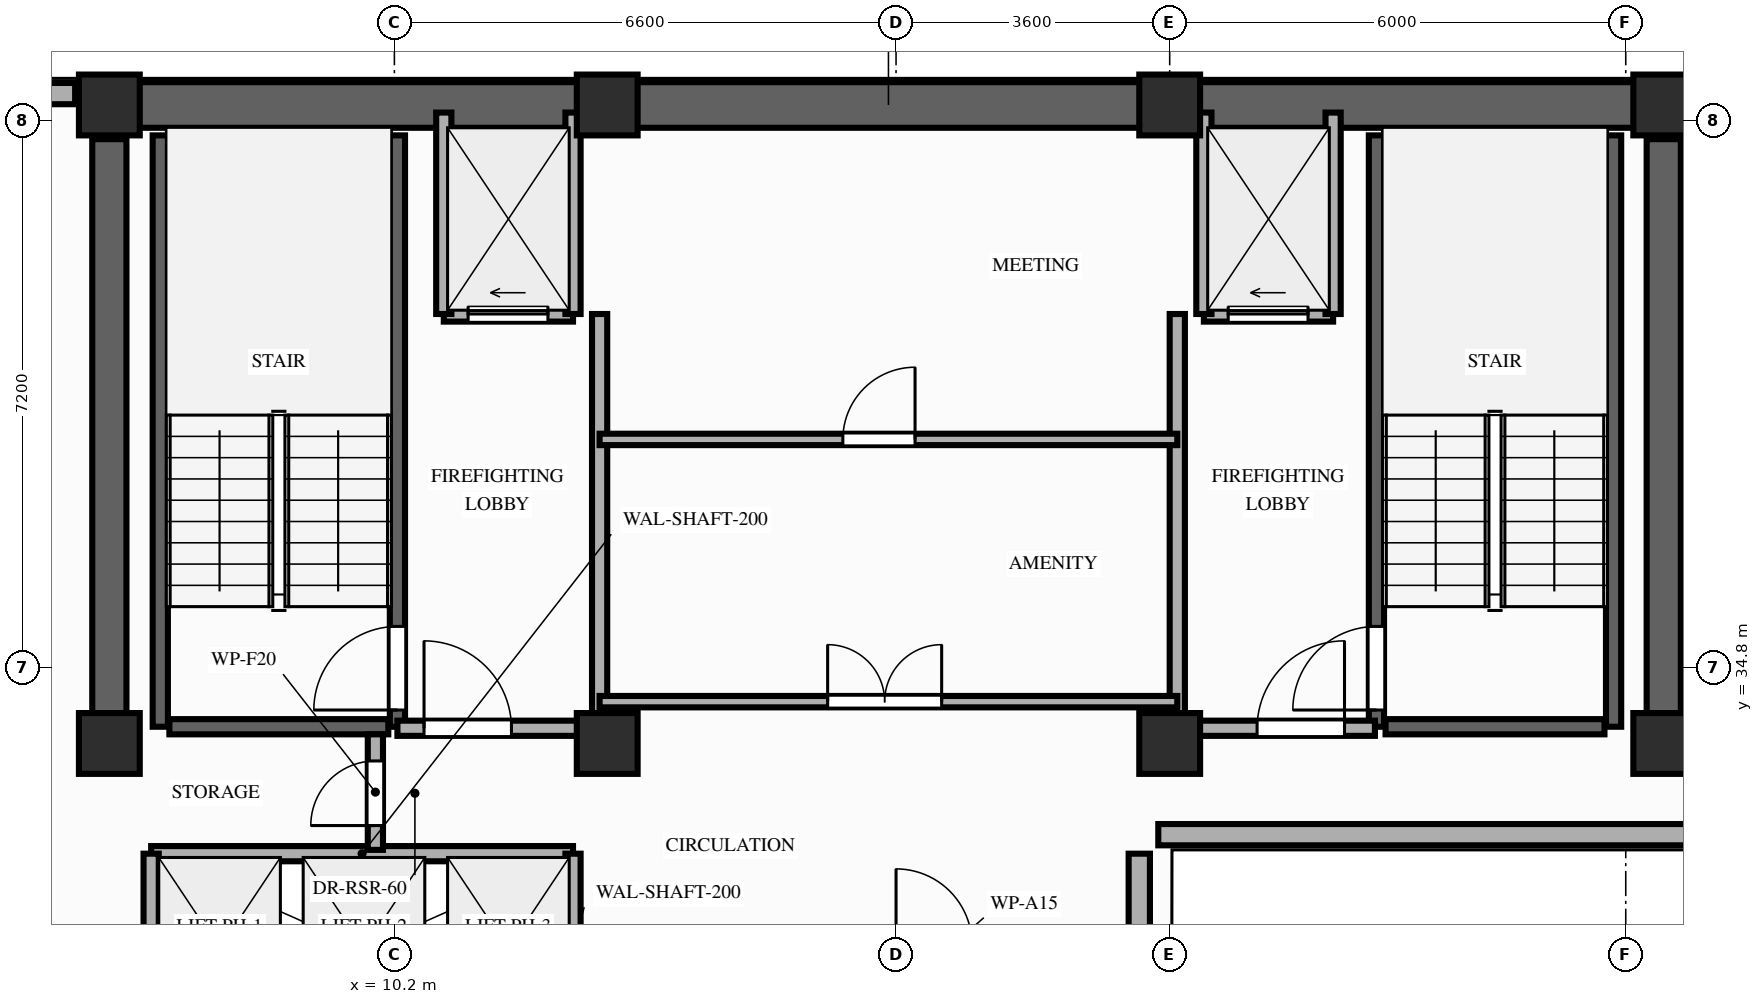
"""IFC4 building model, lengths in metres.
Left out: names, types, materials, properties, quantities, classifications, styles, units other than length and angle.
Written with IfcOpenShell. Run it as: python <this file> out.ifc"""

import sys

from ifc_helpers import new_model, si_unit, direction, frame, frame_2d, origin, origin_2d, place, context, subcontext, project, spatial, rectangle, extrude, element, fill, save


model = new_model("IFC4")
c1 = context("Model", 3, precision=1e-05, world=origin(), true_north=direction((0.0, 1.0)))
c2 = subcontext(c1, "Body", "Model", "MODEL_VIEW")
j1 = project(units=[si_unit("LENGTHUNIT", "METRE"), si_unit("PLANEANGLEUNIT", "RADIAN")], contexts=[c1])
p1 = place(None, origin())
s1 = spatial("IfcSite", under=j1, at=p1, CompositionType="ELEMENT")
p2 = place(p1, origin())
s2 = spatial("IfcBuilding", under=s1, at=p2, CompositionType="ELEMENT")
p3 = place(p2, frame((0.0, 0.0, 234.4)))
s3 = spatial("IfcBuildingStorey", under=s2, at=p3, CompositionType="ELEMENT", Elevation=234.4)
for number, where, z_axis, x_axis in (
    (1, (6.45, 33.8, 0.0), (0.0, 0.0, 1.0), (1.0, 0.0, 0.0)),
    (2, (13.0, 33.8, 0.0), (0.0, 0.0, 1.0), (1.0, 0.0, 0.0)),
    (3, (20.4, 33.8, 0.0), (0.0, 0.0, 1.0), (1.0, 0.0, 0.0)),
    (4, (26.9, 33.8, 0.0), (0.0, 0.0, 1.0), (1.0, 0.0, 0.0)),
    (5, (6.45, 42.2, 0.0), (0.0, 0.0, 1.0), (1.0, 0.0, 0.0)),
    (6, (13.0, 42.2, 0.0), (0.0, 0.0, 1.0), (1.0, 0.0, 0.0)),
    (7, (20.4, 42.2, 0.0), (0.0, 0.0, 1.0), (1.0, 0.0, 0.0)),
    (8, (26.9, 42.2, 0.0), (0.0, 0.0, 1.0), (1.0, 0.0, 0.0)),
):
    element("IfcColumn", number, at=place(p3, frame(where, z_axis=z_axis, x_axis=x_axis)), inside=s3, PredefinedType="COLUMN", context=c2, shape_type="SweptSolid", body=[
        extrude(rectangle(XDim=0.8, YDim=0.8, at=origin_2d()), origin(), (0.0, 0.0, 1.0), 3.2),
    ])
p4 = place(p3, frame((20.0, 10.8, 0.0), z_axis=(0.0, 0.0, 1.0), x_axis=(0.0, 1.0, 0.0)))
e9 = element("IfcWall", 9, at=p4, inside=s3, PredefinedType="STANDARD", context=c2, shape_type="SweptSolid", body=[
    extrude(rectangle(XDim=21.55, YDim=0.28, at=frame_2d((10.775, 0.0))), origin(), (0.0, 0.0, 1.0), 2.55),
])
p5 = place(p4, frame((3.08, 0.0, 0.85)))
e10 = element("IfcOpeningElement", 10, at=p5, cuts=e9, PredefinedType="OPENING", context=c2, shape_type="SweptSolid", body=[
    extrude(rectangle(XDim=2.6, YDim=1.45, at=frame_2d((1.3, 0.725))), frame((0.0, 0.15, 0.0), z_axis=(0.0, -1.0, 0.0), x_axis=(1.0, 0.0, 0.0)), (0.0, 0.0, 1.0), 0.3),
])
p6 = place(p4, frame((8.6, 0.0, 0.85)))
e11 = element("IfcOpeningElement", 11, at=p6, cuts=e9, PredefinedType="OPENING", context=c2, shape_type="SweptSolid", body=[
    extrude(rectangle(XDim=2.6, YDim=1.45, at=frame_2d((1.3, 0.725))), frame((0.0, 0.15, 0.0), z_axis=(0.0, -1.0, 0.0), x_axis=(1.0, 0.0, 0.0)), (0.0, 0.0, 1.0), 0.3),
])
p7 = place(p3, frame((6.0, 42.35, 0.0), z_axis=(0.0, 0.0, 1.0), x_axis=(-1.0, 0.0, 0.0)))
e12 = element("IfcWall", 12, at=p7, inside=s3, PredefinedType="STANDARD", context=c2, shape_type="SweptSolid", body=[
    extrude(rectangle(XDim=1.0, YDim=0.28, at=frame_2d((0.5, 0.0))), origin(), (0.0, 0.0, 1.0), 3.02),
])
p8 = place(p3, frame((20.25, 32.6, 0.0), z_axis=(0.0, 0.0, 1.0), x_axis=(1.0, 0.0, 0.0)))
e13 = element("IfcWall", 13, at=p8, inside=s3, PredefinedType="STANDARD", context=c2, shape_type="SweptSolid", body=[
    extrude(rectangle(XDim=7.35, YDim=0.28, at=frame_2d((3.675, 0.0))), origin(), (0.0, 0.0, 1.0), 2.55),
])
p9 = place(p3, frame((6.45, 42.2, 0.0), z_axis=(0.0, 0.0, 1.0), x_axis=(1.0, 0.0, 0.0)))
e14 = element("IfcWall", 14, at=p9, inside=s3, PredefinedType="SHEAR", context=c2, shape_type="SweptSolid", body=[
    extrude(rectangle(XDim=20.45, YDim=0.6, at=frame_2d((10.225, 0.0))), origin(), (0.0, 0.0, 1.0), 3.02),
])
for number, where, z_axis, x_axis in (
    (15, (6.45, 33.8, 0.0), (0.0, 0.0, 1.0), (0.0, 1.0, 0.0)),
    (16, (26.9, 33.8, 0.0), (0.0, 0.0, 1.0), (0.0, 1.0, 0.0)),
):
    element("IfcWall", number, at=place(p3, frame(where, z_axis=z_axis, x_axis=x_axis)), inside=s3, PredefinedType="SHEAR", context=c2, shape_type="SweptSolid", body=[
        extrude(rectangle(XDim=7.95, YDim=0.45, at=frame_2d((3.975, 0.0))), origin(), (0.0, 0.0, 1.0), 3.02),
    ])
p10 = place(p3, frame((7.12, 34.02, 0.0), z_axis=(0.0, 0.0, 1.0), x_axis=(0.0, 1.0, 0.0)))
e17 = element("IfcWall", 17, at=p10, inside=s3, PredefinedType="SHEAR", context=c2, shape_type="SweptSolid", body=[
    extrude(rectangle(XDim=7.78, YDim=0.2, at=frame_2d((3.89, 0.0))), origin(), (0.0, 0.0, 1.0), 3.02),
])
p11 = place(p3, frame((10.24, 34.02, 0.0), z_axis=(0.0, 0.0, 1.0), x_axis=(0.0, 1.0, 0.0)))
e18 = element("IfcWall", 18, at=p11, inside=s3, PredefinedType="SHEAR", context=c2, shape_type="SweptSolid", body=[
    extrude(rectangle(XDim=7.78, YDim=0.2, at=frame_2d((3.89, 0.0))), origin(), (0.0, 0.0, 1.0), 3.02),
])
p12 = place(p11, frame((0.22, 0.0, 0.0)))
e19 = element("IfcOpeningElement", 19, at=p12, cuts=e18, PredefinedType="OPENING", context=c2, shape_type="SweptSolid", body=[
    extrude(rectangle(XDim=1.1, YDim=2.15, at=frame_2d((0.55, 1.075))), frame((0.0, 0.11, 0.0), z_axis=(0.0, -1.0, 0.0), x_axis=(1.0, 0.0, 0.0)), (0.0, 0.0, 1.0), 0.22),
])
p13 = place(p3, frame((7.24, 34.02, 0.0), z_axis=(0.0, 0.0, 1.0), x_axis=(1.0, 0.0, 0.0)))
e20 = element("IfcWall", 20, at=p13, inside=s3, PredefinedType="SHEAR", context=c2, shape_type="SweptSolid", body=[
    extrude(rectangle(XDim=2.88, YDim=0.2, at=frame_2d((1.44, 0.0))), origin(), (0.0, 0.0, 1.0), 3.02),
])
p14 = place(p3, frame((23.12, 34.02, 0.0), z_axis=(0.0, 0.0, 1.0), x_axis=(0.0, 1.0, 0.0)))
e21 = element("IfcWall", 21, at=p14, inside=s3, PredefinedType="SHEAR", context=c2, shape_type="SweptSolid", body=[
    extrude(rectangle(XDim=7.78, YDim=0.2, at=frame_2d((3.89, 0.0))), origin(), (0.0, 0.0, 1.0), 3.02),
])
p15 = place(p14, frame((0.22, 0.0, 0.0)))
e22 = element("IfcOpeningElement", 22, at=p15, cuts=e21, PredefinedType="OPENING", context=c2, shape_type="SweptSolid", body=[
    extrude(rectangle(XDim=1.1, YDim=2.15, at=frame_2d((0.55, 1.075))), frame((0.0, 0.11, 0.0), z_axis=(0.0, -1.0, 0.0), x_axis=(1.0, 0.0, 0.0)), (0.0, 0.0, 1.0), 0.22),
])
p16 = place(p3, frame((26.24, 34.02, 0.0), z_axis=(0.0, 0.0, 1.0), x_axis=(0.0, 1.0, 0.0)))
e23 = element("IfcWall", 23, at=p16, inside=s3, PredefinedType="SHEAR", context=c2, shape_type="SweptSolid", body=[
    extrude(rectangle(XDim=7.78, YDim=0.2, at=frame_2d((3.89, 0.0))), origin(), (0.0, 0.0, 1.0), 3.02),
])
p17 = place(p3, frame((23.24, 34.02, 0.0), z_axis=(0.0, 0.0, 1.0), x_axis=(1.0, 0.0, 0.0)))
e24 = element("IfcWall", 24, at=p17, inside=s3, PredefinedType="SHEAR", context=c2, shape_type="SweptSolid", body=[
    extrude(rectangle(XDim=2.88, YDim=0.2, at=frame_2d((1.44, 0.0))), origin(), (0.0, 0.0, 1.0), 3.02),
])
p18 = place(p3, frame((7.0, 32.35, 0.0), z_axis=(0.0, 0.0, 1.0), x_axis=(1.0, 0.0, 0.0)))
e25 = element("IfcWall", 25, at=p18, inside=s3, PredefinedType="MOVABLE", context=c2, shape_type="SweptSolid", body=[
    extrude(rectangle(XDim=5.55, YDim=0.2, at=frame_2d((2.775, 0.0))), origin(), (0.0, 0.0, 1.0), 3.02),
])
for number, where, z_axis, x_axis in (
    (26, (7.0, 29.85, 0.0), (0.0, 0.0, 1.0), (0.0, 1.0, 0.0)),
    (27, (12.55, 29.85, 0.0), (0.0, 0.0, 1.0), (0.0, 1.0, 0.0)),
):
    element("IfcWall", number, at=place(p3, frame(where, z_axis=z_axis, x_axis=x_axis)), inside=s3, PredefinedType="MOVABLE", context=c2, shape_type="SweptSolid", body=[
        extrude(rectangle(XDim=2.5, YDim=0.2, at=frame_2d((1.25, 0.0))), origin(), (0.0, 0.0, 1.0), 3.02),
    ])
p19 = place(p3, frame((10.85, 39.45, 0.0), z_axis=(0.0, 0.0, 1.0), x_axis=(1.0, 0.0, 0.0)))
e28 = element("IfcWall", 28, at=p19, inside=s3, PredefinedType="MOVABLE", context=c2, shape_type="SweptSolid", body=[
    extrude(rectangle(XDim=1.7, YDim=0.2, at=frame_2d((0.85, 0.0))), origin(), (0.0, 0.0, 1.0), 3.02),
])
p20 = place(p19, frame((0.32, 0.0, 0.0)))
e29 = element("IfcOpeningElement", 29, at=p20, cuts=e28, PredefinedType="OPENING", context=c2, shape_type="SweptSolid", body=[
    extrude(rectangle(XDim=1.05, YDim=2.15, at=frame_2d((0.525, 1.075))), frame((0.0, 0.11, 0.0), z_axis=(0.0, -1.0, 0.0), x_axis=(1.0, 0.0, 0.0)), (0.0, 0.0, 1.0), 0.22),
])
p21 = place(p3, frame((20.85, 39.45, 0.0), z_axis=(0.0, 0.0, 1.0), x_axis=(1.0, 0.0, 0.0)))
e30 = element("IfcWall", 30, at=p21, inside=s3, PredefinedType="MOVABLE", context=c2, shape_type="SweptSolid", body=[
    extrude(rectangle(XDim=1.7, YDim=0.2, at=frame_2d((0.85, 0.0))), origin(), (0.0, 0.0, 1.0), 3.02),
])
p22 = place(p21, frame((0.32, 0.0, 0.0)))
e31 = element("IfcOpeningElement", 31, at=p22, cuts=e30, PredefinedType="OPENING", context=c2, shape_type="SweptSolid", body=[
    extrude(rectangle(XDim=1.05, YDim=2.15, at=frame_2d((0.525, 1.075))), frame((0.0, 0.11, 0.0), z_axis=(0.0, -1.0, 0.0), x_axis=(1.0, 0.0, 0.0)), (0.0, 0.0, 1.0), 0.22),
])
for number, where, z_axis, x_axis in (
    (32, (10.85, 39.45, 0.0), (0.0, 0.0, 1.0), (0.0, 1.0, 0.0)),
    (33, (12.55, 39.45, 0.0), (0.0, 0.0, 1.0), (0.0, 1.0, 0.0)),
):
    element("IfcWall", number, at=place(p3, frame(where, z_axis=z_axis, x_axis=x_axis)), inside=s3, PredefinedType="MOVABLE", context=c2, shape_type="SweptSolid", body=[
        extrude(rectangle(XDim=2.65, YDim=0.2, at=frame_2d((1.325, 0.0))), origin(), (0.0, 0.0, 1.0), 2.55),
    ])
p23 = place(p3, frame((12.9, 34.0, 0.0), z_axis=(0.0, 0.0, 1.0), x_axis=(0.0, 1.0, 0.0)))
e34 = element("IfcWall", 34, at=p23, inside=s3, PredefinedType="PARTITIONING", context=c2, shape_type="SweptSolid", body=[
    extrude(rectangle(XDim=5.45, YDim=0.2, at=frame_2d((2.725, 0.0))), origin(), (0.0, 0.0, 1.0), 2.55),
])
p24 = place(p3, frame((10.24, 34.0, 0.0), z_axis=(0.0, 0.0, 1.0), x_axis=(1.0, 0.0, 0.0)))
e35 = element("IfcWall", 35, at=p24, inside=s3, PredefinedType="PARTITIONING", context=c2, shape_type="SweptSolid", body=[
    extrude(rectangle(XDim=2.66, YDim=0.2, at=frame_2d((1.33, 0.0))), origin(), (0.0, 0.0, 1.0), 2.55),
])
p25 = place(p24, frame((0.35, 0.0, 0.0)))
e36 = element("IfcOpeningElement", 36, at=p25, cuts=e35, PredefinedType="OPENING", context=c2, shape_type="SweptSolid", body=[
    extrude(rectangle(XDim=1.15, YDim=2.15, at=frame_2d((0.575, 1.075))), frame((0.0, 0.11, 0.0), z_axis=(0.0, -1.0, 0.0), x_axis=(1.0, 0.0, 0.0)), (0.0, 0.0, 1.0), 0.22),
])
for number, where, z_axis, x_axis in (
    (37, (20.85, 39.45, 0.0), (0.0, 0.0, 1.0), (0.0, 1.0, 0.0)),
    (38, (22.55, 39.45, 0.0), (0.0, 0.0, 1.0), (0.0, 1.0, 0.0)),
):
    element("IfcWall", number, at=place(p3, frame(where, z_axis=z_axis, x_axis=x_axis)), inside=s3, PredefinedType="MOVABLE", context=c2, shape_type="SweptSolid", body=[
        extrude(rectangle(XDim=2.65, YDim=0.2, at=frame_2d((1.325, 0.0))), origin(), (0.0, 0.0, 1.0), 2.55),
    ])
p26 = place(p3, frame((20.5, 34.0, 0.0), z_axis=(0.0, 0.0, 1.0), x_axis=(0.0, 1.0, 0.0)))
e39 = element("IfcWall", 39, at=p26, inside=s3, PredefinedType="PARTITIONING", context=c2, shape_type="SweptSolid", body=[
    extrude(rectangle(XDim=5.45, YDim=0.2, at=frame_2d((2.725, 0.0))), origin(), (0.0, 0.0, 1.0), 2.55),
])
p27 = place(p3, frame((20.5, 34.0, 0.0), z_axis=(0.0, 0.0, 1.0), x_axis=(1.0, 0.0, 0.0)))
e40 = element("IfcWall", 40, at=p27, inside=s3, PredefinedType="PARTITIONING", context=c2, shape_type="SweptSolid", body=[
    extrude(rectangle(XDim=2.6, YDim=0.2, at=frame_2d((1.3, 0.0))), origin(), (0.0, 0.0, 1.0), 2.55),
])
p28 = place(p27, frame((1.05, 0.0, 0.0)))
e41 = element("IfcOpeningElement", 41, at=p28, cuts=e40, PredefinedType="OPENING", context=c2, shape_type="SweptSolid", body=[
    extrude(rectangle(XDim=1.15, YDim=2.15, at=frame_2d((0.575, 1.075))), frame((0.0, 0.11, 0.0), z_axis=(0.0, -1.0, 0.0), x_axis=(1.0, 0.0, 0.0)), (0.0, 0.0, 1.0), 0.22),
])
p29 = place(p3, frame((9.95, 32.4, 0.0), z_axis=(0.0, 0.0, 1.0), x_axis=(0.0, 1.0, 0.0)))
e42 = element("IfcWall", 42, at=p29, inside=s3, PredefinedType="PARTITIONING", context=c2, shape_type="SweptSolid", body=[
    extrude(rectangle(XDim=1.52, YDim=0.2, at=frame_2d((0.76, 0.0))), origin(), (0.0, 0.0, 1.0), 2.55),
])
p30 = place(p29, frame((0.32, 0.0, 0.0)))
e43 = element("IfcOpeningElement", 43, at=p30, cuts=e42, PredefinedType="OPENING", context=c2, shape_type="SweptSolid", body=[
    extrude(rectangle(XDim=0.85, YDim=2.05, at=frame_2d((0.425, 1.025))), frame((0.0, 0.11, 0.0), z_axis=(0.0, -1.0, 0.0), x_axis=(1.0, 0.0, 0.0)), (0.0, 0.0, 1.0), 0.22),
])
p31 = place(p3, frame((12.9, 34.35, 0.0), z_axis=(0.0, 0.0, 1.0), x_axis=(1.0, 0.0, 0.0)))
e44 = element("IfcWall", 44, at=p31, inside=s3, PredefinedType="PARTITIONING", context=c2, shape_type="SweptSolid", body=[
    extrude(rectangle(XDim=7.6, YDim=0.15, at=frame_2d((3.8, 0.0))), origin(), (0.0, 0.0, 1.0), 3.02),
])
p32 = place(p31, frame((3.0, 0.0, 0.0)))
e45 = element("IfcOpeningElement", 45, at=p32, cuts=e44, PredefinedType="OPENING", context=c2, shape_type="SweptSolid", body=[
    extrude(rectangle(XDim=1.5, YDim=2.15, at=frame_2d((0.75, 1.075))), frame((0.0, 0.085, 0.0), z_axis=(0.0, -1.0, 0.0), x_axis=(1.0, 0.0, 0.0)), (0.0, 0.0, 1.0), 0.17),
])
p33 = place(p3, frame((12.9, 37.8, 0.0), z_axis=(0.0, 0.0, 1.0), x_axis=(1.0, 0.0, 0.0)))
e46 = element("IfcWall", 46, at=p33, inside=s3, PredefinedType="PARTITIONING", context=c2, shape_type="SweptSolid", body=[
    extrude(rectangle(XDim=7.6, YDim=0.15, at=frame_2d((3.8, 0.0))), origin(), (0.0, 0.0, 1.0), 3.02),
])
p34 = place(p33, frame((3.2, 0.0, 0.0)))
e47 = element("IfcOpeningElement", 47, at=p34, cuts=e46, PredefinedType="OPENING", context=c2, shape_type="SweptSolid", body=[
    extrude(rectangle(XDim=0.95, YDim=2.15, at=frame_2d((0.475, 1.075))), frame((0.0, 0.085, 0.0), z_axis=(0.0, -1.0, 0.0), x_axis=(1.0, 0.0, 0.0)), (0.0, 0.0, 1.0), 0.17),
])
p35 = place(p12, origin())
e48 = element("IfcDoor", 48, at=p35, inside=s3, OperationType="SINGLE_SWING_LEFT", PredefinedType="DOOR", context=c2, shape_type="SweptSolid", body=[
    extrude(rectangle(XDim=1.1, YDim=2.15, at=frame_2d((0.55, 1.075))), frame((0.0, 0.025, 0.0), z_axis=(0.0, -1.0, 0.0), x_axis=(1.0, 0.0, 0.0)), (0.0, 0.0, 1.0), 0.05),
])
fill(e19, e48)
p36 = place(p15, origin())
e49 = element("IfcDoor", 49, at=p36, inside=s3, OperationType="SINGLE_SWING_LEFT", PredefinedType="DOOR", context=c2, shape_type="SweptSolid", body=[
    extrude(rectangle(XDim=1.1, YDim=2.15, at=frame_2d((0.55, 1.075))), frame((0.0, 0.025, 0.0), z_axis=(0.0, -1.0, 0.0), x_axis=(1.0, 0.0, 0.0)), (0.0, 0.0, 1.0), 0.05),
])
fill(e22, e49)
p37 = place(p20, origin())
e50 = element("IfcDoor", 50, at=p37, inside=s3, OperationType="SLIDING_TO_LEFT", PredefinedType="DOOR", context=c2, shape_type="SweptSolid", body=[
    extrude(rectangle(XDim=1.05, YDim=2.15, at=frame_2d((0.525, 1.075))), frame((0.0, 0.025, 0.0), z_axis=(0.0, -1.0, 0.0), x_axis=(1.0, 0.0, 0.0)), (0.0, 0.0, 1.0), 0.05),
])
fill(e29, e50)
p38 = place(p22, origin())
e51 = element("IfcDoor", 51, at=p38, inside=s3, OperationType="SLIDING_TO_LEFT", PredefinedType="DOOR", context=c2, shape_type="SweptSolid", body=[
    extrude(rectangle(XDim=1.05, YDim=2.15, at=frame_2d((0.525, 1.075))), frame((0.0, 0.025, 0.0), z_axis=(0.0, -1.0, 0.0), x_axis=(1.0, 0.0, 0.0)), (0.0, 0.0, 1.0), 0.05),
])
fill(e31, e51)
p39 = place(p25, origin())
e52 = element("IfcDoor", 52, at=p39, inside=s3, OperationType="SINGLE_SWING_LEFT", PredefinedType="DOOR", context=c2, shape_type="SweptSolid", body=[
    extrude(rectangle(XDim=1.15, YDim=2.15, at=frame_2d((0.575, 1.075))), frame((0.0, 0.025, 0.0), z_axis=(0.0, -1.0, 0.0), x_axis=(1.0, 0.0, 0.0)), (0.0, 0.0, 1.0), 0.05),
])
fill(e36, e52)
p40 = place(p28, origin())
e53 = element("IfcDoor", 53, at=p40, inside=s3, OperationType="SINGLE_SWING_RIGHT", PredefinedType="DOOR", context=c2, shape_type="SweptSolid", body=[
    extrude(rectangle(XDim=1.15, YDim=2.15, at=frame_2d((0.575, 1.075))), frame((0.0, 0.025, 0.0), z_axis=(0.0, -1.0, 0.0), x_axis=(1.0, 0.0, 0.0)), (0.0, 0.0, 1.0), 0.05),
])
fill(e41, e53)
p41 = place(p30, origin())
e54 = element("IfcDoor", 54, at=p41, inside=s3, OperationType="SINGLE_SWING_LEFT", PredefinedType="DOOR", context=c2, shape_type="SweptSolid", body=[
    extrude(rectangle(XDim=0.85, YDim=2.05, at=frame_2d((0.425, 1.025))), frame((0.0, 0.025, 0.0), z_axis=(0.0, -1.0, 0.0), x_axis=(1.0, 0.0, 0.0)), (0.0, 0.0, 1.0), 0.05),
])
fill(e43, e54)
p42 = place(p32, origin())
e55 = element("IfcDoor", 55, at=p42, inside=s3, OperationType="DOUBLE_DOOR_SINGLE_SWING", PredefinedType="DOOR", context=c2, shape_type="SweptSolid", body=[
    extrude(rectangle(XDim=1.5, YDim=2.15, at=frame_2d((0.75, 1.075))), frame((0.0, 0.025, 0.0), z_axis=(0.0, -1.0, 0.0), x_axis=(1.0, 0.0, 0.0)), (0.0, 0.0, 1.0), 0.05),
])
fill(e45, e55)
p43 = place(p34, origin())
e56 = element("IfcDoor", 56, at=p43, inside=s3, OperationType="SINGLE_SWING_RIGHT", PredefinedType="DOOR", context=c2, shape_type="SweptSolid", body=[
    extrude(rectangle(XDim=0.95, YDim=2.15, at=frame_2d((0.475, 1.075))), frame((0.0, 0.025, 0.0), z_axis=(0.0, -1.0, 0.0), x_axis=(1.0, 0.0, 0.0)), (0.0, 0.0, 1.0), 0.05),
])
fill(e47, e56)
save(model, sys.argv[1])
